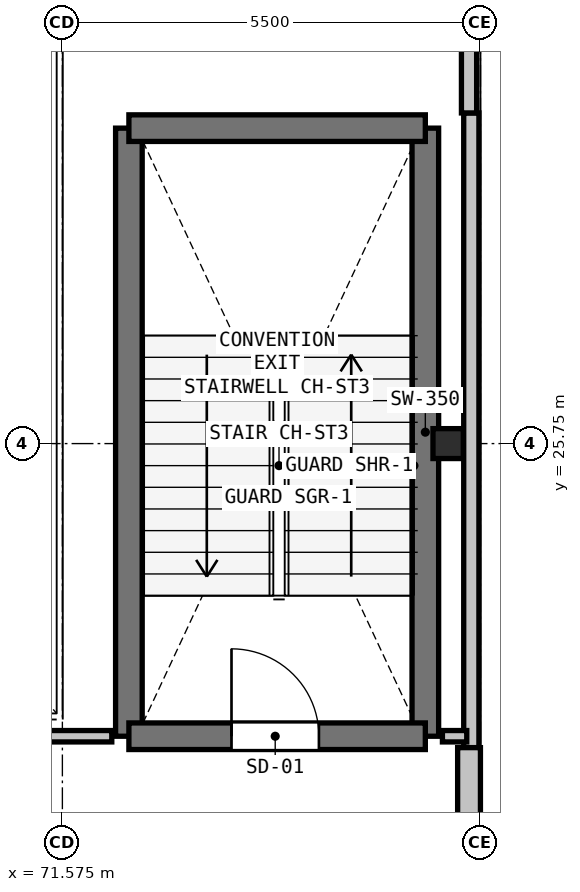
"""IFC4 building model, lengths in metres.
Left out: names, types, materials, properties, quantities, classifications, styles, units other than length and angle.
Written with IfcOpenShell. Run it as: python <this file> out.ifc"""

import sys

from ifc_helpers import new_model, si_unit, direction, frame, frame_2d, origin, origin_2d, place, context, subcontext, project, spatial, rectangle, i_section, extrude, element, fill, save


model = new_model("IFC4")
c1 = context("Model", 3, precision=1e-05, world=origin(), true_north=direction((0.0, 1.0)))
c2 = subcontext(c1, "Body", "Model", "MODEL_VIEW")
j1 = project(units=[si_unit("LENGTHUNIT", "METRE"), si_unit("PLANEANGLEUNIT", "RADIAN")], contexts=[c1])
p1 = place(None, origin())
s1 = spatial("IfcSite", under=j1, at=p1, CompositionType="ELEMENT")
p2 = place(p1, origin())
s2 = spatial("IfcBuilding", under=s1, at=p2, CompositionType="ELEMENT")
p3 = place(p2, frame((0.0, 0.0, 5.1)))
s3 = spatial("IfcBuildingStorey", under=s2, at=p3, CompositionType="ELEMENT", Elevation=5.1)
p4 = place(p3, frame((76.65, 25.75, 0.0), z_axis=(0.0, 0.0, 1.0), x_axis=(1.0, 0.0, 0.0)))
e1 = element("IfcColumn", 1, at=p4, inside=s3, PredefinedType="COLUMN", context=c2, shape_type="SweptSolid", body=[
    extrude(i_section(OverallWidth=0.399, OverallDepth=0.394, WebThickness=0.023, FlangeThickness=0.037, at=origin_2d()), origin(), (0.0, 0.0, 1.0), 4.5),
])
p5 = place(p3, frame((76.955, 30.1, 0.0), z_axis=(0.0, 0.0, 1.0), x_axis=(0.0, -1.0, 0.0)))
e2 = element("IfcWall", 2, at=p5, inside=s3, PredefinedType="PARAPET", context=c2, shape_type="SweptSolid", body=[
    extrude(rectangle(XDim=8.35, YDim=0.2, at=frame_2d((4.175, 0.0))), origin(), (0.0, 0.0, 1.0), 3.79),
])
p6 = place(p3, frame((76.925, 21.75, 0.0), z_axis=(0.0, 0.0, 1.0), x_axis=(0.0, -1.0, 0.0)))
e3 = element("IfcWall", 3, at=p6, inside=s3, PredefinedType="SOLIDWALL", context=c2, shape_type="SweptSolid", body=[
    extrude(rectangle(XDim=18.5, YDim=0.3, at=frame_2d((9.25, 0.0))), origin(), (0.0, 0.0, 1.0), 3.79),
])
p7 = place(p3, frame((76.925, 38.9, 0.0), z_axis=(0.0, 0.0, 1.0), x_axis=(0.0, -1.0, 0.0)))
e4 = element("IfcWall", 4, at=p7, inside=s3, PredefinedType="PARAPET", context=c2, shape_type="SweptSolid", body=[
    extrude(rectangle(XDim=8.8, YDim=0.2, at=frame_2d((4.4, 0.0))), origin(), (0.0, 0.0, 1.0), 0.2),
])
for number, where, z_axis, x_axis in (
    (5, (76.35, 29.9, 0.0), (0.0, 0.0, 1.0), (0.0, -1.0, 0.0)),
    (6, (72.45, 21.9, 0.0), (0.0, 0.0, 1.0), (0.0, 1.0, 0.0)),
):
    element("IfcWall", number, at=place(p3, frame(where, z_axis=z_axis, x_axis=x_axis)), inside=s3, PredefinedType="SHEAR", context=c2, shape_type="SweptSolid", body=[
        extrude(rectangle(XDim=8.0, YDim=0.35, at=frame_2d((4.0, 0.0))), origin(), (0.0, 0.0, 1.0), 4.18),
    ])
p8 = place(p3, frame((72.45, 29.9, 0.0), z_axis=(0.0, 0.0, 1.0), x_axis=(1.0, 0.0, 0.0)))
e7 = element("IfcWall", 7, at=p8, inside=s3, PredefinedType="SHEAR", context=c2, shape_type="SweptSolid", body=[
    extrude(rectangle(XDim=3.9, YDim=0.35, at=frame_2d((1.95, 0.0))), origin(), (0.0, 0.0, 1.0), 4.18),
])
p9 = place(p3, frame((72.45, 21.9, 0.0), z_axis=(0.0, 0.0, 1.0), x_axis=(1.0, 0.0, 0.0)))
e8 = element("IfcWall", 8, at=p9, inside=s3, PredefinedType="SHEAR", context=c2, shape_type="SweptSolid", body=[
    extrude(rectangle(XDim=3.9, YDim=0.35, at=frame_2d((1.95, 0.0))), origin(), (0.0, 0.0, 1.0), 4.18),
])
p10 = place(p9, frame((1.35, 0.0, 0.0)))
e9 = element("IfcOpeningElement", 9, at=p10, cuts=e8, PredefinedType="OPENING", context=c2, shape_type="SweptSolid", body=[
    extrude(rectangle(XDim=1.15, YDim=2.15, at=frame_2d((0.575, 1.075))), frame((0.0, 0.185, 0.0), z_axis=(0.0, -1.0, 0.0), x_axis=(1.0, 0.0, 0.0)), (0.0, 0.0, 1.0), 0.37),
])
p11 = place(p3, frame((63.85, 21.9, 0.0), z_axis=(0.0, 0.0, 1.0), x_axis=(1.0, 0.0, 0.0)))
e10 = element("IfcWall", 10, at=p11, inside=s3, PredefinedType="PARTITIONING", context=c2, shape_type="SweptSolid", body=[
    extrude(rectangle(XDim=8.375, YDim=0.15, at=frame_2d((4.188, 0.0))), origin(), (0.0, 0.0, 1.0), 3.858),
])
p12 = place(p3, frame((76.575, 21.9, 0.0), z_axis=(0.0, 0.0, 1.0), x_axis=(1.0, 0.0, 0.0)))
e11 = element("IfcWall", 11, at=p12, inside=s3, PredefinedType="PARTITIONING", context=c2, shape_type="SweptSolid", body=[
    extrude(rectangle(XDim=0.32, YDim=0.15, at=frame_2d((0.16, 0.0))), origin(), (0.0, 0.0, 1.0), 3.79),
])
p13 = place(p10, origin())
e12 = element("IfcDoor", 12, at=p13, inside=s3, OperationType="SINGLE_SWING_LEFT", PredefinedType="DOOR", context=c2, shape_type="SweptSolid", body=[
    extrude(rectangle(XDim=1.15, YDim=2.15, at=frame_2d((0.575, 1.075))), frame((0.0, 0.025, 0.0), z_axis=(0.0, -1.0, 0.0), x_axis=(1.0, 0.0, 0.0)), (0.0, 0.0, 1.0), 0.05),
])
fill(e9, e12)
save(model, sys.argv[1])
